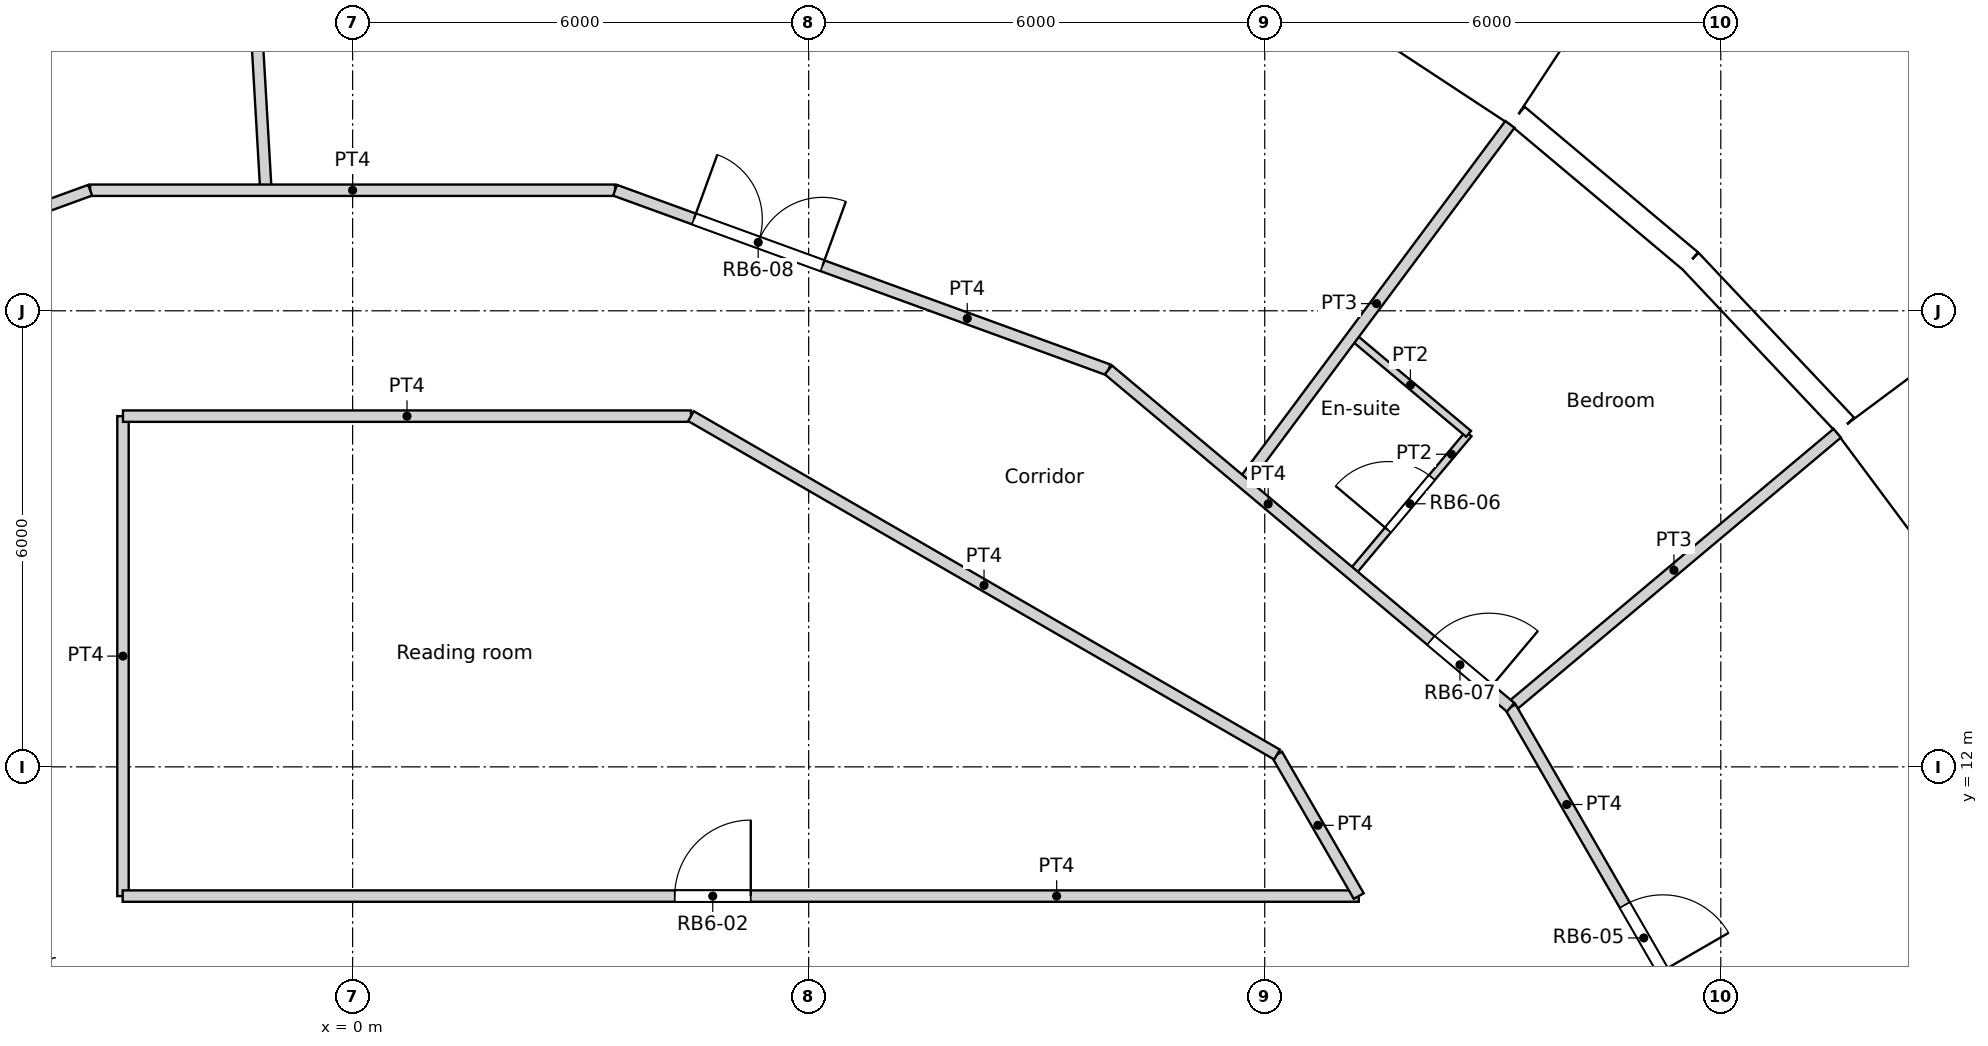
"""IFC4 building model, lengths in metres.
Left out: names, types, materials, properties, quantities, classifications, styles, units other than length and angle.
Written with IfcOpenShell. Run it as: python <this file> out.ifc"""

import sys

from ifc_helpers import new_model, si_unit, direction, frame, frame_2d, origin, origin_2d, place, context, subcontext, project, spatial, rectangle, circle, extrude, element, fill, save


model = new_model("IFC4")
c1 = context("Model", 3, precision=1e-05, world=origin(), true_north=direction((0.0, 1.0)))
c2 = subcontext(c1, "Body", "Model", "MODEL_VIEW")
j1 = project(units=[si_unit("LENGTHUNIT", "METRE"), si_unit("PLANEANGLEUNIT", "RADIAN")], contexts=[c1])
p1 = place(None, origin())
s1 = spatial("IfcSite", under=j1, at=p1, CompositionType="ELEMENT")
p2 = place(p1, origin())
s2 = spatial("IfcBuilding", under=s1, at=p2, CompositionType="ELEMENT")
p3 = place(p2, frame((0.0, 0.0, 180.0)))
s3 = spatial("IfcBuildingStorey", under=s2, at=p3, CompositionType="ELEMENT", Elevation=180.0)
for number, where, z_axis, x_axis in (
    (1, (18.805, 15.779, 0.0), (0.0, 0.0, 1.0), (1.0, 0.0, 0.0)),
    (2, (14.659, 19.69, 0.0), (0.0, 0.0, 1.0), (1.0, 0.0, 0.0)),
):
    element("IfcColumn", number, at=place(p3, frame(where, z_axis=z_axis, x_axis=x_axis)), inside=s3, PredefinedType="COLUMN", context=c2, shape_type="SweptSolid", body=[
        extrude(circle(Radius=0.6, at=origin_2d()), origin(), (0.0, 0.0, 1.0), 3.6),
    ])
for number, where, z_axis, x_axis in (
    (3, (15.552, 10.603, 0.0), (0.0, 0.0, 1.0), (1.0, 0.0, 0.0)),
    (4, (11.735, 14.716, 0.0), (0.0, 0.0, 1.0), (1.0, 0.0, 0.0)),
    (5, (6.876, 17.521, 0.0), (0.0, 0.0, 1.0), (1.0, 0.0, 0.0)),
    (6, (1.406, 18.77, 0.0), (0.0, 0.0, 1.0), (1.0, 0.0, 0.0)),
    (7, (-4.188, 18.35, 0.0), (0.0, 0.0, 1.0), (1.0, 0.0, 0.0)),
):
    element("IfcColumn", number, at=place(p3, frame(where, z_axis=z_axis, x_axis=x_axis)), inside=s3, PredefinedType="COLUMN", context=c2, shape_type="SweptSolid", body=[
        extrude(circle(Radius=0.65, at=origin_2d()), origin(), (0.0, 0.0, 1.0), 3.6),
    ])
p4 = place(p3, frame((21.895, 14.43, -0.3), z_axis=(0.0, 0.0, 1.0), x_axis=(-0.597183717734, 0.802104486506, 0.0)))
e8 = element("IfcWall", 8, at=p4, inside=s3, PredefinedType="ELEMENTEDWALL", context=c2, shape_type="SweptSolid", body=[
    extrude(rectangle(XDim=3.0, YDim=1.45, at=frame_2d((1.5, 0.0))), origin(), (0.0, 0.0, 1.0), 3.6),
])
p5 = place(p4, frame((1.5, 0.0, 1.85)))
e9 = element("IfcOpeningElement", 9, at=p5, cuts=e8, PredefinedType="OPENING", context=c2, shape_type="SweptSolid", body=[
    extrude(circle(Radius=0.9, at=origin_2d()), frame((0.0, 0.735, 0.0), z_axis=(0.0, -1.0, 0.0), x_axis=(1.0, 0.0, 0.0)), (0.0, 0.0, 1.0), 1.47),
])
p6 = place(p3, frame((19.64, 16.493, 0.0), z_axis=(0.0, 0.0, 1.0), x_axis=(-0.686235184166, 0.727379730273, 0.0)))
e10 = element("IfcWall", 10, at=p6, inside=s3, PredefinedType="SOLIDWALL", context=c2, shape_type="SweptSolid", body=[
    extrude(rectangle(XDim=2.973, YDim=0.3, at=frame_2d((1.486, 0.0))), origin(), (0.0, 0.0, 1.0), 3.3),
])
p7 = place(p6, frame((1.486, 0.0, 1.55)))
e11 = element("IfcOpeningElement", 11, at=p7, cuts=e10, PredefinedType="OPENING", context=c2, shape_type="SweptSolid", body=[
    extrude(circle(Radius=0.9, at=origin_2d()), frame((0.0, 0.16, 0.0), z_axis=(0.0, -1.0, 0.0), x_axis=(1.0, 0.0, 0.0)), (0.0, 0.0, 1.0), 0.32),
])
p8 = place(p3, frame((17.6, 18.655, 0.0), z_axis=(0.0, 0.0, 1.0), x_axis=(-0.766049350637, 0.642781761089, 0.0)))
e12 = element("IfcWall", 12, at=p8, inside=s3, PredefinedType="SOLIDWALL", context=c2, shape_type="SweptSolid", body=[
    extrude(rectangle(XDim=2.973, YDim=0.3, at=frame_2d((1.486, 0.0))), origin(), (0.0, 0.0, 1.0), 3.3),
])
p9 = place(p8, frame((1.486, 0.0, 1.55)))
e13 = element("IfcOpeningElement", 13, at=p9, cuts=e12, PredefinedType="OPENING", context=c2, shape_type="SweptSolid", body=[
    extrude(circle(Radius=0.9, at=origin_2d()), frame((0.0, 0.16, 0.0), z_axis=(0.0, -1.0, 0.0), x_axis=(1.0, 0.0, 0.0)), (0.0, 0.0, 1.0), 0.32),
])
p10 = place(p3, frame((15.639, 21.048, -0.3), z_axis=(0.0, 0.0, 1.0), x_axis=(-0.835514416706, 0.549468524554, 0.0)))
e14 = element("IfcWall", 14, at=p10, inside=s3, PredefinedType="ELEMENTEDWALL", context=c2, shape_type="SweptSolid", body=[
    extrude(rectangle(XDim=3.0, YDim=1.45, at=frame_2d((1.5, 0.0))), origin(), (0.0, 0.0, 1.0), 3.6),
])
p11 = place(p10, frame((1.5, 0.0, 1.85)))
e15 = element("IfcOpeningElement", 15, at=p11, cuts=e14, PredefinedType="OPENING", context=c2, shape_type="SweptSolid", body=[
    extrude(circle(Radius=0.9, at=origin_2d()), frame((0.0, 0.735, 0.0), z_axis=(0.0, -1.0, 0.0), x_axis=(1.0, 0.0, 0.0)), (0.0, 0.0, 1.0), 1.47),
])
p12 = place(p3, frame((-3.025, 10.3, 0.0), z_axis=(0.0, 0.0, 1.0), x_axis=(1.0, 0.0, 0.0)))
e16 = element("IfcWall", 16, at=p12, inside=s3, PredefinedType="PARTITIONING", context=c2, shape_type="SweptSolid", body=[
    extrude(rectangle(XDim=16.262, YDim=0.15, at=frame_2d((8.131, 0.0))), origin(), (0.0, 0.0, 1.0), 3.3),
])
p13 = place(p12, frame((7.263, 0.0, 0.0)))
e17 = element("IfcOpeningElement", 17, at=p13, cuts=e16, PredefinedType="OPENING", context=c2, shape_type="SweptSolid", body=[
    extrude(rectangle(XDim=1.0, YDim=2.04, at=frame_2d((0.5, 1.02))), frame((0.0, 0.075, 0.0), z_axis=(0.0, -1.0, 0.0), x_axis=(1.0, 0.0, 0.0)), (0.0, 0.0, 1.0), 0.15),
])
p14 = place(p3, frame((12.162, 12.162, 0.0), z_axis=(0.0, 0.0, 1.0), x_axis=(0.499961633463, -0.866047553582, 0.0)))
e18 = element("IfcWall", 18, at=p14, inside=s3, PredefinedType="PARTITIONING", context=c2, shape_type="SweptSolid", body=[
    extrude(rectangle(XDim=2.15, YDim=0.15, at=frame_2d((1.075, 0.0))), origin(), (0.0, 0.0, 1.0), 3.3),
])
p15 = place(p3, frame((15.235, 12.784, 0.0), z_axis=(0.0, 0.0, 1.0), x_axis=(0.499914202267, -0.866074933462, 0.0)))
e19 = element("IfcWall", 19, at=p15, inside=s3, PredefinedType="PARTITIONING", context=c2, shape_type="SweptSolid", body=[
    extrude(rectangle(XDim=6.907, YDim=0.15, at=frame_2d((3.454, 0.0))), origin(), (0.0, 0.0, 1.0), 3.3),
])
p16 = place(p15, frame((3.004, 0.0, 0.0)))
e20 = element("IfcOpeningElement", 20, at=p16, cuts=e19, PredefinedType="OPENING", context=c2, shape_type="SweptSolid", body=[
    extrude(rectangle(XDim=1.0, YDim=2.04, at=frame_2d((0.5, 1.02))), frame((0.0, 0.075, 0.0), z_axis=(0.0, -1.0, 0.0), x_axis=(1.0, 0.0, 0.0)), (0.0, 0.0, 1.0), 0.15),
])
p17 = place(p3, frame((9.943, 17.222, 0.0), z_axis=(0.0, 0.0, 1.0), x_axis=(0.766192104565, -0.642611592567, 0.0)))
e21 = element("IfcWall", 21, at=p17, inside=s3, PredefinedType="PARTITIONING", context=c2, shape_type="SweptSolid", body=[
    extrude(rectangle(XDim=6.906, YDim=0.15, at=frame_2d((3.453, 0.0))), origin(), (0.0, 0.0, 1.0), 3.3),
])
p18 = place(p17, frame((5.537, 0.0, 0.0)))
e22 = element("IfcOpeningElement", 22, at=p18, cuts=e21, PredefinedType="OPENING", context=c2, shape_type="SweptSolid", body=[
    extrude(rectangle(XDim=1.0, YDim=2.1, at=frame_2d((0.5, 1.05))), frame((0.0, 0.075, 0.0), z_axis=(0.0, -1.0, 0.0), x_axis=(1.0, 0.0, 0.0)), (0.0, 0.0, 1.0), 0.15),
])
p19 = place(p3, frame((4.452, 16.614, 0.0), z_axis=(0.0, 0.0, 1.0), x_axis=(0.866005203721, -0.500034985904, 0.0)))
e23 = element("IfcWall", 23, at=p19, inside=s3, PredefinedType="PARTITIONING", context=c2, shape_type="SweptSolid", body=[
    extrude(rectangle(XDim=8.903, YDim=0.15, at=frame_2d((4.452, 0.0))), origin(), (0.0, 0.0, 1.0), 3.3),
])
p20 = place(p3, frame((-3.021, 16.614, 0.0), z_axis=(0.0, 0.0, 1.0), x_axis=(1.0, 0.0, 0.0)))
e24 = element("IfcWall", 24, at=p20, inside=s3, PredefinedType="PARTITIONING", context=c2, shape_type="SweptSolid", body=[
    extrude(rectangle(XDim=7.473, YDim=0.15, at=frame_2d((3.736, 0.0))), origin(), (0.0, 0.0, 1.0), 3.3),
])
p21 = place(p3, frame((-3.021, 10.3, 0.0), z_axis=(0.0, 0.0, 1.0), x_axis=(0.0, 1.0, 0.0)))
e25 = element("IfcWall", 25, at=p21, inside=s3, PredefinedType="PARTITIONING", context=c2, shape_type="SweptSolid", body=[
    extrude(rectangle(XDim=6.314, YDim=0.15, at=frame_2d((3.157, 0.0))), origin(), (0.0, 0.0, 1.0), 3.3),
])
p22 = place(p3, frame((-3.453, 19.586, 0.0), z_axis=(0.0, 0.0, 1.0), x_axis=(1.0, 0.0, 0.0)))
e26 = element("IfcWall", 26, at=p22, inside=s3, PredefinedType="PARTITIONING", context=c2, shape_type="SweptSolid", body=[
    extrude(rectangle(XDim=6.906, YDim=0.15, at=frame_2d((3.453, 0.0))), origin(), (0.0, 0.0, 1.0), 3.3),
])
p23 = place(p3, frame((3.453, 19.586, 0.0), z_axis=(0.0, 0.0, 1.0), x_axis=(0.939672634566, -0.342075050021, 0.0)))
e27 = element("IfcWall", 27, at=p23, inside=s3, PredefinedType="PARTITIONING", context=c2, shape_type="SweptSolid", body=[
    extrude(rectangle(XDim=6.908, YDim=0.15, at=frame_2d((3.454, 0.0))), origin(), (0.0, 0.0, 1.0), 3.3),
])
p24 = place(p23, frame((1.104, 0.0, 0.0)))
e28 = element("IfcOpeningElement", 28, at=p24, cuts=e27, PredefinedType="OPENING", context=c2, shape_type="SweptSolid", body=[
    extrude(rectangle(XDim=1.8, YDim=2.1, at=frame_2d((0.9, 1.05))), frame((0.0, 0.075, 0.0), z_axis=(0.0, -1.0, 0.0), x_axis=(1.0, 0.0, 0.0)), (0.0, 0.0, 1.0), 0.15),
])
p25 = place(p3, frame((-9.944, 17.223, 0.0), z_axis=(0.0, 0.0, 1.0), x_axis=(0.939672634566, 0.342075050021, 0.0)))
e29 = element("IfcWall", 29, at=p25, inside=s3, PredefinedType="PARTITIONING", context=c2, shape_type="SweptSolid", body=[
    extrude(rectangle(XDim=6.908, YDim=0.15, at=frame_2d((3.454, 0.0))), origin(), (0.0, 0.0, 1.0), 3.3),
])
p26 = place(p25, frame((2.954, 0.0, 0.0)))
e30 = element("IfcOpeningElement", 30, at=p26, cuts=e29, PredefinedType="OPENING", context=c2, shape_type="SweptSolid", body=[
    extrude(rectangle(XDim=1.0, YDim=2.04, at=frame_2d((0.5, 1.02))), frame((0.0, 0.075, 0.0), z_axis=(0.0, -1.0, 0.0), x_axis=(1.0, 0.0, 0.0)), (0.0, 0.0, 1.0), 0.15),
])
p27 = place(p3, frame((15.235, 12.784, 0.0), z_axis=(0.0, 0.0, 1.0), x_axis=(0.76609059793, 0.642732600514, 0.0)))
e31 = element("IfcWall", 31, at=p27, inside=s3, PredefinedType="PARTITIONING", context=c2, shape_type="SweptSolid", body=[
    extrude(rectangle(XDim=5.609, YDim=0.15, at=frame_2d((2.804, 0.0))), origin(), (0.0, 0.0, 1.0), 3.3),
])
p28 = place(p3, frame((13.139, 14.542, 0.0), z_axis=(0.0, 0.0, 1.0), x_axis=(0.642731657745, 0.766091388891, 0.0)))
e32 = element("IfcWall", 32, at=p28, inside=s3, PredefinedType="PARTITIONING", context=c2, shape_type="SweptSolid", body=[
    extrude(rectangle(XDim=2.401, YDim=0.1, at=frame_2d((1.2, 0.0))), origin(), (0.0, 0.0, 1.0), 3.3),
])
p29 = place(p28, frame((0.75, 0.0, 0.0)))
e33 = element("IfcOpeningElement", 33, at=p29, cuts=e32, PredefinedType="OPENING", context=c2, shape_type="SweptSolid", body=[
    extrude(rectangle(XDim=0.9, YDim=2.04, at=frame_2d((0.45, 1.02))), frame((0.0, 0.05, 0.0), z_axis=(0.0, -1.0, 0.0), x_axis=(1.0, 0.0, 0.0)), (0.0, 0.0, 1.0), 0.1),
])
p30 = place(p3, frame((13.151, 17.665, 0.0), z_axis=(0.0, 0.0, 1.0), x_axis=(0.766224532916, -0.642572925945, 0.0)))
e34 = element("IfcWall", 34, at=p30, inside=s3, PredefinedType="PARTITIONING", context=c2, shape_type="SweptSolid", body=[
    extrude(rectangle(XDim=1.998, YDim=0.1, at=frame_2d((0.999, 0.0))), origin(), (0.0, 0.0, 1.0), 3.3),
])
p31 = place(p3, frame((11.716, 15.737, 0.0), z_axis=(0.0, 0.0, 1.0), x_axis=(0.597198494348, 0.802093484793, 0.0)))
e35 = element("IfcWall", 35, at=p31, inside=s3, PredefinedType="PARTITIONING", context=c2, shape_type="SweptSolid", body=[
    extrude(rectangle(XDim=5.878, YDim=0.15, at=frame_2d((2.939, 0.0))), origin(), (0.0, 0.0, 1.0), 3.3),
])
p32 = place(p3, frame((-1.483, 25.454, 0.0), z_axis=(0.0, 0.0, 1.0), x_axis=(0.058147412668, -0.998308007781, 0.0)))
e36 = element("IfcWall", 36, at=p32, inside=s3, PredefinedType="PARTITIONING", context=c2, shape_type="SweptSolid", body=[
    extrude(rectangle(XDim=5.878, YDim=0.15, at=frame_2d((2.939, 0.0))), origin(), (0.0, 0.0, 1.0), 3.3),
])
p33 = place(p5, origin())
e37 = element("IfcWindow", 37, at=p33, inside=s3, PartitioningType="SINGLE_PANEL", PredefinedType="WINDOW", context=c2, shape_type="SweptSolid", body=[
    extrude(circle(Radius=0.9, at=origin_2d()), frame((0.0, 0.695, 0.0), z_axis=(0.0, -1.0, 0.0), x_axis=(1.0, 0.0, 0.0)), (0.0, 0.0, 1.0), 0.1),
])
fill(e9, e37)
p34 = place(p7, origin())
e38 = element("IfcWindow", 38, at=p34, inside=s3, PartitioningType="SINGLE_PANEL", PredefinedType="WINDOW", context=c2, shape_type="SweptSolid", body=[
    extrude(circle(Radius=0.9, at=origin_2d()), frame((0.0, 0.12, 0.0), z_axis=(0.0, -1.0, 0.0), x_axis=(1.0, 0.0, 0.0)), (0.0, 0.0, 1.0), 0.1),
])
fill(e11, e38)
p35 = place(p9, origin())
e39 = element("IfcWindow", 39, at=p35, inside=s3, PartitioningType="SINGLE_PANEL", PredefinedType="WINDOW", context=c2, shape_type="SweptSolid", body=[
    extrude(circle(Radius=0.9, at=origin_2d()), frame((0.0, 0.12, 0.0), z_axis=(0.0, -1.0, 0.0), x_axis=(1.0, 0.0, 0.0)), (0.0, 0.0, 1.0), 0.1),
])
fill(e13, e39)
p36 = place(p11, origin())
e40 = element("IfcWindow", 40, at=p36, inside=s3, PartitioningType="SINGLE_PANEL", PredefinedType="WINDOW", context=c2, shape_type="SweptSolid", body=[
    extrude(circle(Radius=0.9, at=origin_2d()), frame((0.0, 0.695, 0.0), z_axis=(0.0, -1.0, 0.0), x_axis=(1.0, 0.0, 0.0)), (0.0, 0.0, 1.0), 0.1),
])
fill(e15, e40)
p37 = place(p13, origin())
e41 = element("IfcDoor", 41, at=p37, inside=s3, OperationType="SINGLE_SWING_RIGHT", PredefinedType="DOOR", context=c2, shape_type="SweptSolid", body=[
    extrude(rectangle(XDim=1.0, YDim=2.04, at=frame_2d((0.5, 1.02))), frame((0.0, 0.025, 0.0), z_axis=(0.0, -1.0, 0.0), x_axis=(1.0, 0.0, 0.0)), (0.0, 0.0, 1.0), 0.05),
])
fill(e17, e41)
p38 = place(p16, origin())
e42 = element("IfcDoor", 42, at=p38, inside=s3, OperationType="SINGLE_SWING_RIGHT", PredefinedType="DOOR", context=c2, shape_type="SweptSolid", body=[
    extrude(rectangle(XDim=1.0, YDim=2.04, at=frame_2d((0.5, 1.02))), frame((0.0, 0.025, 0.0), z_axis=(0.0, -1.0, 0.0), x_axis=(1.0, 0.0, 0.0)), (0.0, 0.0, 1.0), 0.05),
])
fill(e20, e42)
p39 = place(p29, origin())
e43 = element("IfcDoor", 43, at=p39, inside=s3, OperationType="SINGLE_SWING_LEFT", PredefinedType="DOOR", context=c2, shape_type="SweptSolid", body=[
    extrude(rectangle(XDim=0.9, YDim=2.04, at=frame_2d((0.45, 1.02))), frame((0.0, 0.025, 0.0), z_axis=(0.0, -1.0, 0.0), x_axis=(1.0, 0.0, 0.0)), (0.0, 0.0, 1.0), 0.05),
])
fill(e33, e43)
p40 = place(p18, origin())
e44 = element("IfcDoor", 44, at=p40, inside=s3, OperationType="SINGLE_SWING_RIGHT", PredefinedType="DOOR", context=c2, shape_type="SweptSolid", body=[
    extrude(rectangle(XDim=1.0, YDim=2.1, at=frame_2d((0.5, 1.05))), frame((0.0, 0.025, 0.0), z_axis=(0.0, -1.0, 0.0), x_axis=(1.0, 0.0, 0.0)), (0.0, 0.0, 1.0), 0.05),
])
fill(e22, e44)
p41 = place(p24, origin())
e45 = element("IfcDoor", 45, at=p41, inside=s3, OperationType="DOUBLE_DOOR_SINGLE_SWING", PredefinedType="DOOR", context=c2, shape_type="SweptSolid", body=[
    extrude(rectangle(XDim=1.8, YDim=2.1, at=frame_2d((0.9, 1.05))), frame((0.0, 0.025, 0.0), z_axis=(0.0, -1.0, 0.0), x_axis=(1.0, 0.0, 0.0)), (0.0, 0.0, 1.0), 0.05),
])
fill(e28, e45)
save(model, sys.argv[1])
